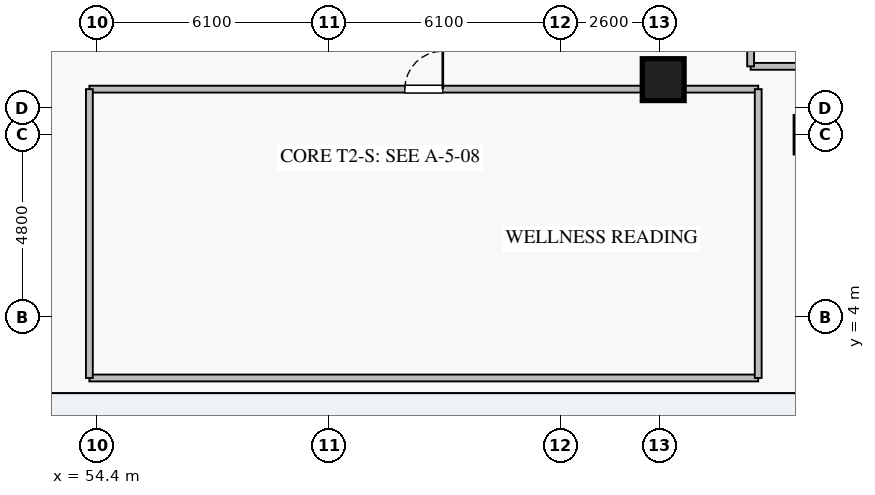
"""IFC4 building model, lengths in metres.
Left out: names, types, materials, properties, quantities, classifications, styles, units other than length and angle.
Written with IfcOpenShell. Run it as: python <this file> out.ifc"""

import sys

from ifc_helpers import new_model, si_unit, direction, frame, frame_2d, origin, origin_2d, place, context, subcontext, project, spatial, rectangle, extrude, source, transform, mapped, element, fill, save


model = new_model("IFC4")
c1 = context("Model", 3, precision=1e-05, world=origin(), true_north=direction((0.0, 1.0)))
c2 = subcontext(c1, "Body", "Model", "MODEL_VIEW")
j1 = project(units=[si_unit("LENGTHUNIT", "METRE"), si_unit("PLANEANGLEUNIT", "RADIAN")], contexts=[c1])
p1 = place(None, origin())
s1 = spatial("IfcSite", under=j1, at=p1, CompositionType="ELEMENT")
p2 = place(p1, origin())
s2 = spatial("IfcBuilding", under=s1, at=p2, CompositionType="ELEMENT")
p3 = place(p2, frame((0.0, 0.0, 5.0)))
s3 = spatial("IfcBuildingStorey", under=s2, at=p3, CompositionType="ELEMENT", Elevation=5.0)
m1 = source(origin(), c2, "Body", "SweptSolid", [
    extrude(rectangle(XDim=1.1, YDim=1.1, at=origin_2d()), origin(), (0.0, 0.0, 1.0), 4.4),
])
p4 = place(p3, frame((69.3, 10.25, 0.0), z_axis=(0.0, 0.0, 1.0), x_axis=(1.0, 0.0, 0.0)))
e1 = element("IfcColumn", 1, at=p4, inside=s3, PredefinedType="COLUMN", context=c2, shape_type="MappedRepresentation", body=[
    mapped(m1, transform((0.0, 0.0, 0.0), x_axis=(1.0, 0.0, 0.0), y_axis=(0.0, 1.0, 0.0), z_axis=(0.0, 0.0, 1.0), scale=1.0)),
])
p5 = place(p3, frame((71.6, 10.6, 0.0), z_axis=(0.0, 0.0, 1.0), x_axis=(1.0, 0.0, 0.0)))
e2 = element("IfcWall", 2, at=p5, inside=s3, PredefinedType="PARTITIONING", context=c2, shape_type="SweptSolid", body=[
    extrude(rectangle(XDim=2.15, YDim=0.18, at=frame_2d((1.075, 0.0))), origin(), (0.0, 0.0, 1.0), 4.18),
])
p6 = place(p3, frame((71.6, 10.6, 0.0), z_axis=(0.0, 0.0, 1.0), x_axis=(0.0, 1.0, 0.0)))
e3 = element("IfcWall", 3, at=p6, inside=s3, PredefinedType="PARTITIONING", context=c2, shape_type="SweptSolid", body=[
    extrude(rectangle(XDim=24.8, YDim=0.18, at=frame_2d((12.4, 0.0))), origin(), (0.0, 0.0, 1.0), 4.18),
])
p7 = place(p6, frame((11.9, 0.0, 0.0)))
e4 = element("IfcOpeningElement", 4, at=p7, cuts=e3, PredefinedType="OPENING", context=c2, shape_type="SweptSolid", body=[
    extrude(rectangle(XDim=1.0, YDim=2.05, at=frame_2d((0.5, 1.025))), frame((0.0, 0.1, 0.0), z_axis=(0.0, -1.0, 0.0), x_axis=(1.0, 0.0, 0.0)), (0.0, 0.0, 1.0), 0.2),
])
p8 = place(p3, frame((54.2, 2.4, 0.0), z_axis=(0.0, 0.0, 1.0), x_axis=(1.0, 0.0, 0.0)))
e5 = element("IfcWall", 5, at=p8, inside=s3, PredefinedType="PARTITIONING", context=c2, shape_type="SweptSolid", body=[
    extrude(rectangle(XDim=17.6, YDim=0.18, at=frame_2d((8.8, 0.0))), origin(), (0.0, 0.0, 1.0), 4.18),
])
p9 = place(p3, frame((54.2, 10.0, 0.0), z_axis=(0.0, 0.0, 1.0), x_axis=(1.0, 0.0, 0.0)))
e6 = element("IfcWall", 6, at=p9, inside=s3, PredefinedType="PARTITIONING", context=c2, shape_type="SweptSolid", body=[
    extrude(rectangle(XDim=17.6, YDim=0.18, at=frame_2d((8.8, 0.0))), origin(), (0.0, 0.0, 1.0), 3.675),
])
p10 = place(p9, frame((8.3, 0.0, 0.0)))
e7 = element("IfcOpeningElement", 7, at=p10, cuts=e6, PredefinedType="OPENING", context=c2, shape_type="SweptSolid", body=[
    extrude(rectangle(XDim=1.0, YDim=2.05, at=frame_2d((0.5, 1.025))), frame((0.0, 0.1, 0.0), z_axis=(0.0, -1.0, 0.0), x_axis=(1.0, 0.0, 0.0)), (0.0, 0.0, 1.0), 0.2),
])
for number, where, z_axis, x_axis in (
    (8, (54.2, 2.4, 0.0), (0.0, 0.0, 1.0), (0.0, 1.0, 0.0)),
    (9, (71.8, 2.4, 0.0), (0.0, 0.0, 1.0), (0.0, 1.0, 0.0)),
):
    element("IfcWall", number, at=place(p3, frame(where, z_axis=z_axis, x_axis=x_axis)), inside=s3, PredefinedType="PARTITIONING", context=c2, shape_type="SweptSolid", body=[
        extrude(rectangle(XDim=7.6, YDim=0.18, at=frame_2d((3.8, 0.0))), origin(), (0.0, 0.0, 1.0), 4.18),
    ])
m2 = source(origin(), c2, "Body", "SweptSolid", [
    extrude(rectangle(XDim=1.0, YDim=2.05, at=frame_2d((0.5, 1.025))), frame((0.0, 0.025, 0.0), z_axis=(0.0, -1.0, 0.0), x_axis=(1.0, 0.0, 0.0)), (0.0, 0.0, 1.0), 0.05),
])
p11 = place(p10, origin())
e10 = element("IfcDoor", 10, at=p11, inside=s3, OperationType="SINGLE_SWING_RIGHT", PredefinedType="DOOR", context=c2, shape_type="MappedRepresentation", body=[
    mapped(m2, transform((0.0, 0.0, 0.0), x_axis=(1.0, 0.0, 0.0), y_axis=(0.0, 1.0, 0.0), z_axis=(0.0, 0.0, 1.0), scale=1.0)),
])
fill(e7, e10)
save(model, sys.argv[1])
